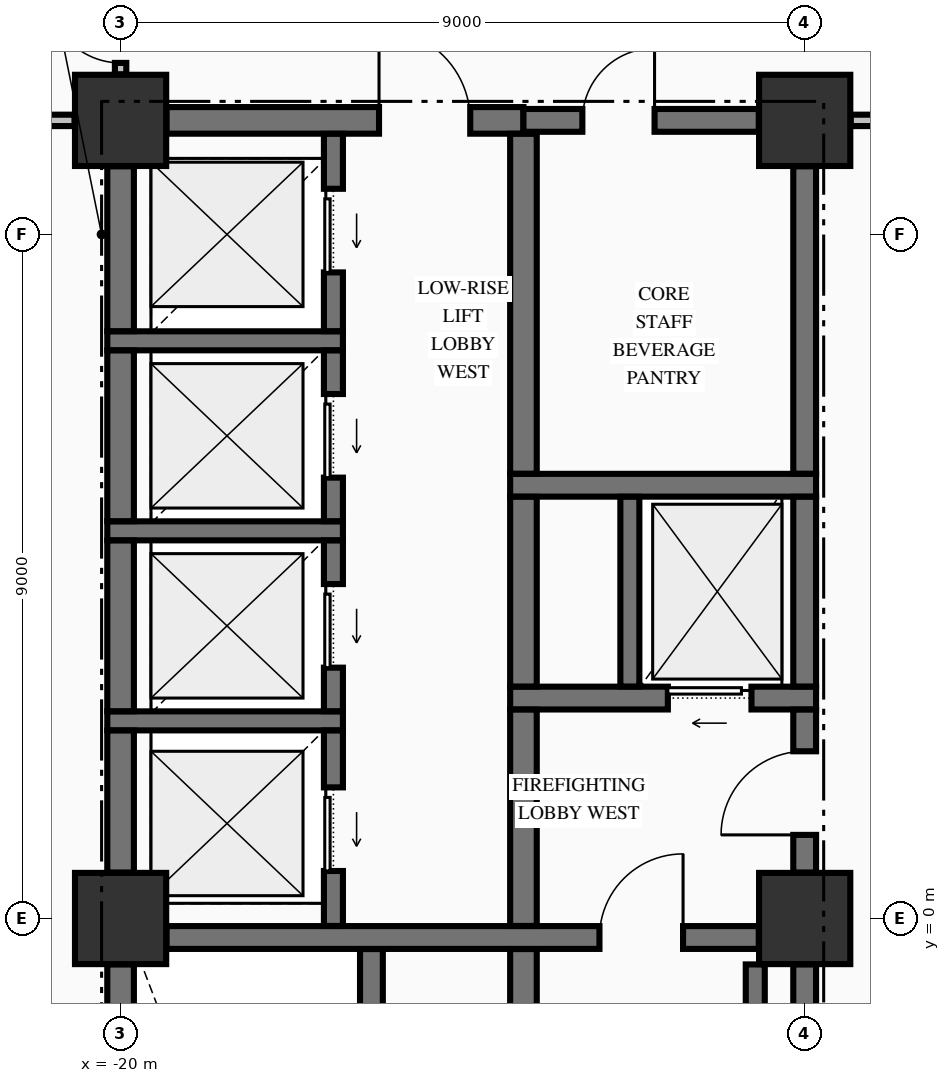
"""IFC4 building model, lengths in metres.
Left out: names, types, materials, properties, quantities, classifications, styles, units other than length and angle.
Written with IfcOpenShell. Run it as: python <this file> out.ifc"""

import sys

from ifc_helpers import new_model, si_unit, direction, frame, frame_2d, origin, origin_2d, place, context, subcontext, project, spatial, rectangle, extrude, element, fill, save


model = new_model("IFC4")
c1 = context("Model", 3, precision=1e-05, world=origin(), true_north=direction((0.0, 1.0)))
c2 = subcontext(c1, "Body", "Model", "MODEL_VIEW")
j1 = project(units=[si_unit("LENGTHUNIT", "METRE"), si_unit("PLANEANGLEUNIT", "RADIAN")], contexts=[c1])
p1 = place(None, origin())
s1 = spatial("IfcSite", under=j1, at=p1, CompositionType="ELEMENT")
p2 = place(p1, origin())
s2 = spatial("IfcBuilding", under=s1, at=p2, CompositionType="ELEMENT")
p3 = place(p2, frame((0.0, 0.0, 30.77)))
s3 = spatial("IfcBuildingStorey", under=s2, at=p3, CompositionType="ELEMENT", Elevation=30.77)
for number, where, z_axis, x_axis in (
    (1, (-20.0, 10.5, -0.25), (0.0, 0.0, 1.0), (1.0, 0.0, 0.0)),
    (2, (-11.0, 0.0, -0.25), (0.0, 0.0, 1.0), (1.0, 0.0, 0.0)),
    (3, (-11.0, 10.5, -0.25), (0.0, 0.0, 1.0), (1.0, 0.0, 0.0)),
    (4, (-20.0, 0.0, -0.25), (0.0, 0.0, 1.0), (1.0, 0.0, 0.0)),
):
    element("IfcColumn", number, at=place(p3, frame(where, z_axis=z_axis, x_axis=x_axis)), inside=s3, PredefinedType="COLUMN", context=c2, shape_type="SweptSolid", body=[
        extrude(rectangle(XDim=1.2, YDim=1.2, at=origin_2d()), origin(), (0.0, 0.0, 1.0), 3.52),
    ])
p4 = place(p3, frame((-19.396, -0.25, 0.0), z_axis=(0.0, 0.0, 1.0), x_axis=(1.0, 0.0, 0.0)))
e5 = element("IfcWall", 5, at=p4, inside=s3, PredefinedType="SHEAR", context=c2, shape_type="SweptSolid", body=[
    extrude(rectangle(XDim=7.792, YDim=0.3, at=frame_2d((3.896, 0.0))), origin(), (0.0, 0.0, 1.0), 3.27),
])
p5 = place(p4, frame((5.696, 0.0, 0.0)))
e6 = element("IfcOpeningElement", 6, at=p5, cuts=e5, PredefinedType="OPENING", context=c2, shape_type="SweptSolid", body=[
    extrude(rectangle(XDim=1.1, YDim=2.15, at=frame_2d((0.55, 1.075))), frame((0.0, 0.16, 0.0), z_axis=(0.0, -1.0, 0.0), x_axis=(1.0, 0.0, 0.0)), (0.0, 0.0, 1.0), 0.32),
])
p6 = place(p3, frame((-20.175, 2.6, 0.0), z_axis=(0.0, 0.0, 1.0), x_axis=(1.0, 0.0, 0.0)))
e7 = element("IfcWall", 7, at=p6, inside=s3, PredefinedType="SOLIDWALL", context=c2, shape_type="SweptSolid", body=[
    extrude(rectangle(XDim=3.1, YDim=0.25, at=frame_2d((1.55, 0.0))), origin(), (0.0, 0.0, 1.0), 3.27),
])
p7 = place(p3, frame((-14.875, 2.9, 0.0), z_axis=(0.0, 0.0, 1.0), x_axis=(1.0, 0.0, 0.0)))
e8 = element("IfcWall", 8, at=p7, inside=s3, PredefinedType="SHEAR", context=c2, shape_type="SweptSolid", body=[
    extrude(rectangle(XDim=4.025, YDim=0.3, at=frame_2d((2.012, 0.0))), origin(), (0.0, 0.0, 1.0), 3.27),
])
p8 = place(p7, frame((2.075, 0.0, 0.0)))
e9 = element("IfcOpeningElement", 9, at=p8, cuts=e8, PredefinedType="OPENING", context=c2, shape_type="SweptSolid", body=[
    extrude(rectangle(XDim=1.1, YDim=2.2, at=frame_2d((0.55, 1.1))), frame((0.0, 0.16, 0.0), z_axis=(0.0, -1.0, 0.0), x_axis=(1.0, 0.0, 0.0)), (0.0, 0.0, 1.0), 0.32),
])
p9 = place(p3, frame((-20.175, 5.1, 0.0), z_axis=(0.0, 0.0, 1.0), x_axis=(1.0, 0.0, 0.0)))
e10 = element("IfcWall", 10, at=p9, inside=s3, PredefinedType="SOLIDWALL", context=c2, shape_type="SweptSolid", body=[
    extrude(rectangle(XDim=3.1, YDim=0.25, at=frame_2d((1.55, 0.0))), origin(), (0.0, 0.0, 1.0), 3.27),
])
p10 = place(p3, frame((-14.875, 5.7, 0.0), z_axis=(0.0, 0.0, 1.0), x_axis=(1.0, 0.0, 0.0)))
e11 = element("IfcWall", 11, at=p10, inside=s3, PredefinedType="SHEAR", context=c2, shape_type="SweptSolid", body=[
    extrude(rectangle(XDim=4.025, YDim=0.3, at=frame_2d((2.012, 0.0))), origin(), (0.0, 0.0, 1.0), 3.27),
])
p11 = place(p3, frame((-20.175, 7.6, 0.0), z_axis=(0.0, 0.0, 1.0), x_axis=(1.0, 0.0, 0.0)))
e12 = element("IfcWall", 12, at=p11, inside=s3, PredefinedType="SOLIDWALL", context=c2, shape_type="SweptSolid", body=[
    extrude(rectangle(XDim=3.1, YDim=0.25, at=frame_2d((1.55, 0.0))), origin(), (0.0, 0.0, 1.0), 3.27),
])
p12 = place(p3, frame((-19.396, 10.5, 0.0), z_axis=(0.0, 0.0, 1.0), x_axis=(1.0, 0.0, 0.0)))
e13 = element("IfcWall", 13, at=p12, inside=s3, PredefinedType="SHEAR", context=c2, shape_type="SweptSolid", body=[
    extrude(rectangle(XDim=4.696, YDim=0.35, at=frame_2d((2.348, 0.0))), origin(), (0.0, 0.0, 1.0), 3.27),
])
p13 = place(p12, frame((2.796, 0.0, 0.0)))
e14 = element("IfcOpeningElement", 14, at=p13, cuts=e13, PredefinedType="OPENING", context=c2, shape_type="SweptSolid", body=[
    extrude(rectangle(XDim=1.2, YDim=2.15, at=frame_2d((0.6, 1.075))), frame((0.0, 0.185, 0.0), z_axis=(0.0, -1.0, 0.0), x_axis=(1.0, 0.0, 0.0)), (0.0, 0.0, 1.0), 0.37),
])
p14 = place(p3, frame((-14.7, 10.5, 0.0), z_axis=(0.0, 0.0, 1.0), x_axis=(1.0, 0.0, 0.0)))
e15 = element("IfcWall", 15, at=p14, inside=s3, PredefinedType="SHEAR", context=c2, shape_type="SweptSolid", body=[
    extrude(rectangle(XDim=3.096, YDim=0.3, at=frame_2d((1.548, 0.0))), origin(), (0.0, 0.0, 1.0), 3.27),
])
p15 = place(p14, frame((0.775, 0.0, 0.0)))
e16 = element("IfcOpeningElement", 16, at=p15, cuts=e15, PredefinedType="OPENING", context=c2, shape_type="SweptSolid", body=[
    extrude(rectangle(XDim=0.95, YDim=2.15, at=frame_2d((0.475, 1.075))), frame((0.0, 0.16, 0.0), z_axis=(0.0, -1.0, 0.0), x_axis=(1.0, 0.0, 0.0)), (0.0, 0.0, 1.0), 0.32),
])
p16 = place(p3, frame((-23.835, 10.5, 0.0), z_axis=(0.0, 0.0, 1.0), x_axis=(1.0, 0.0, 0.0)))
e17 = element("IfcWall", 17, at=p16, inside=s3, PredefinedType="PARTITIONING", context=c2, shape_type="SweptSolid", body=[
    extrude(rectangle(XDim=3.229, YDim=0.15, at=frame_2d((1.615, 0.0))), origin(), (0.0, 0.0, 1.0), 3.27),
])
p17 = place(p16, frame((1.335, 0.0, 0.0)))
e18 = element("IfcOpeningElement", 18, at=p17, cuts=e17, PredefinedType="OPENING", context=c2, shape_type="SweptSolid", body=[
    extrude(rectangle(XDim=1.0, YDim=2.15, at=frame_2d((0.5, 1.075))), frame((0.0, 0.085, 0.0), z_axis=(0.0, -1.0, 0.0), x_axis=(1.0, 0.0, 0.0)), (0.0, 0.0, 1.0), 0.17),
])
p18 = place(p3, frame((-10.394, 10.5, 0.0), z_axis=(0.0, 0.0, 1.0), x_axis=(1.0, 0.0, 0.0)))
e19 = element("IfcWall", 19, at=p18, inside=s3, PredefinedType="PARTITIONING", context=c2, shape_type="SweptSolid", body=[
    extrude(rectangle(XDim=20.788, YDim=0.15, at=frame_2d((10.394, 0.0))), origin(), (0.0, 0.0, 1.0), 3.27),
])
p19 = place(p18, frame((0.319, 0.0, 0.0)))
e20 = element("IfcOpeningElement", 20, at=p19, cuts=e19, PredefinedType="OPENING", context=c2, shape_type="SweptSolid", body=[
    extrude(rectangle(XDim=1.05, YDim=2.15, at=frame_2d((0.525, 1.075))), frame((0.0, 0.085, 0.0), z_axis=(0.0, -1.0, 0.0), x_axis=(1.0, 0.0, 0.0)), (0.0, 0.0, 1.0), 0.17),
])
p20 = place(p18, frame((19.419, 0.0, 0.0)))
e21 = element("IfcOpeningElement", 21, at=p20, cuts=e19, PredefinedType="OPENING", context=c2, shape_type="SweptSolid", body=[
    extrude(rectangle(XDim=1.05, YDim=2.15, at=frame_2d((0.525, 1.075))), frame((0.0, 0.085, 0.0), z_axis=(0.0, -1.0, 0.0), x_axis=(1.0, 0.0, 0.0)), (0.0, 0.0, 1.0), 0.17),
])
p21 = place(p3, frame((-20.0, -9.346, 0.0), z_axis=(0.0, 0.0, 1.0), x_axis=(0.0, 1.0, 0.0)))
e22 = element("IfcWall", 22, at=p21, inside=s3, PredefinedType="SHEAR", context=c2, shape_type="SweptSolid", body=[
    extrude(rectangle(XDim=8.742, YDim=0.35, at=frame_2d((4.371, 0.0))), origin(), (0.0, 0.0, 1.0), 3.27),
])
p22 = place(p3, frame((-20.0, 0.604, 0.0), z_axis=(0.0, 0.0, 1.0), x_axis=(0.0, 1.0, 0.0)))
e23 = element("IfcWall", 23, at=p22, inside=s3, PredefinedType="SHEAR", context=c2, shape_type="SweptSolid", body=[
    extrude(rectangle(XDim=1.869, YDim=0.35, at=frame_2d((0.935, 0.0))), origin(), (0.0, 0.0, 1.0), 3.27),
])
for number, where, z_axis, x_axis in (
    (24, (-20.0, 2.727, 0.0), (0.0, 0.0, 1.0), (0.0, 1.0, 0.0)),
    (25, (-20.0, 5.227, 0.0), (0.0, 0.0, 1.0), (0.0, 1.0, 0.0)),
):
    element("IfcWall", number, at=place(p3, frame(where, z_axis=z_axis, x_axis=x_axis)), inside=s3, PredefinedType="SHEAR", context=c2, shape_type="SweptSolid", body=[
        extrude(rectangle(XDim=2.246, YDim=0.35, at=frame_2d((1.123, 0.0))), origin(), (0.0, 0.0, 1.0), 3.27),
    ])
p23 = place(p3, frame((-20.0, 7.727, 0.0), z_axis=(0.0, 0.0, 1.0), x_axis=(0.0, 1.0, 0.0)))
e26 = element("IfcWall", 26, at=p23, inside=s3, PredefinedType="SHEAR", context=c2, shape_type="SweptSolid", body=[
    extrude(rectangle(XDim=2.169, YDim=0.35, at=frame_2d((1.084, 0.0))), origin(), (0.0, 0.0, 1.0), 3.27),
])
p24 = place(p3, frame((-17.2, -0.098, 0.0), z_axis=(0.0, 0.0, 1.0), x_axis=(0.0, 1.0, 0.0)))
e27 = element("IfcWall", 27, at=p24, inside=s3, PredefinedType="SOLIDWALL", context=c2, shape_type="SweptSolid", body=[
    extrude(rectangle(XDim=2.571, YDim=0.25, at=frame_2d((1.285, 0.0))), origin(), (0.0, 0.0, 1.0), 3.27),
])
p25 = place(p24, frame((0.723, 0.0, 0.0)))
e28 = element("IfcOpeningElement", 28, at=p25, cuts=e27, PredefinedType="OPENING", context=c2, shape_type="SweptSolid", body=[
    extrude(rectangle(XDim=1.1, YDim=2.2, at=frame_2d((0.55, 1.1))), frame((0.0, 0.135, 0.0), z_axis=(0.0, -1.0, 0.0), x_axis=(1.0, 0.0, 0.0)), (0.0, 0.0, 1.0), 0.27),
])
p26 = place(p3, frame((-17.2, 2.727, 0.0), z_axis=(0.0, 0.0, 1.0), x_axis=(0.0, 1.0, 0.0)))
e29 = element("IfcWall", 29, at=p26, inside=s3, PredefinedType="SOLIDWALL", context=c2, shape_type="SweptSolid", body=[
    extrude(rectangle(XDim=2.246, YDim=0.25, at=frame_2d((1.123, 0.0))), origin(), (0.0, 0.0, 1.0), 3.27),
])
p27 = place(p26, frame((0.573, 0.0, 0.0)))
e30 = element("IfcOpeningElement", 30, at=p27, cuts=e29, PredefinedType="OPENING", context=c2, shape_type="SweptSolid", body=[
    extrude(rectangle(XDim=1.1, YDim=2.2, at=frame_2d((0.55, 1.1))), frame((0.0, 0.135, 0.0), z_axis=(0.0, -1.0, 0.0), x_axis=(1.0, 0.0, 0.0)), (0.0, 0.0, 1.0), 0.27),
])
p28 = place(p3, frame((-17.2, 5.227, 0.0), z_axis=(0.0, 0.0, 1.0), x_axis=(0.0, 1.0, 0.0)))
e31 = element("IfcWall", 31, at=p28, inside=s3, PredefinedType="SOLIDWALL", context=c2, shape_type="SweptSolid", body=[
    extrude(rectangle(XDim=2.246, YDim=0.25, at=frame_2d((1.123, 0.0))), origin(), (0.0, 0.0, 1.0), 3.27),
])
p29 = place(p28, frame((0.573, 0.0, 0.0)))
e32 = element("IfcOpeningElement", 32, at=p29, cuts=e31, PredefinedType="OPENING", context=c2, shape_type="SweptSolid", body=[
    extrude(rectangle(XDim=1.1, YDim=2.2, at=frame_2d((0.55, 1.1))), frame((0.0, 0.135, 0.0), z_axis=(0.0, -1.0, 0.0), x_axis=(1.0, 0.0, 0.0)), (0.0, 0.0, 1.0), 0.27),
])
p30 = place(p3, frame((-17.2, 7.727, 0.0), z_axis=(0.0, 0.0, 1.0), x_axis=(0.0, 1.0, 0.0)))
e33 = element("IfcWall", 33, at=p30, inside=s3, PredefinedType="SOLIDWALL", context=c2, shape_type="SweptSolid", body=[
    extrude(rectangle(XDim=2.596, YDim=0.25, at=frame_2d((1.298, 0.0))), origin(), (0.0, 0.0, 1.0), 3.27),
])
p31 = place(p30, frame((0.773, 0.0, 0.0)))
e34 = element("IfcOpeningElement", 34, at=p31, cuts=e33, PredefinedType="OPENING", context=c2, shape_type="SweptSolid", body=[
    extrude(rectangle(XDim=1.1, YDim=2.2, at=frame_2d((0.55, 1.1))), frame((0.0, 0.135, 0.0), z_axis=(0.0, -1.0, 0.0), x_axis=(1.0, 0.0, 0.0)), (0.0, 0.0, 1.0), 0.27),
])
p32 = place(p3, frame((-16.7, -9.773, 0.0), z_axis=(0.0, 0.0, 1.0), x_axis=(0.0, 1.0, 0.0)))
e35 = element("IfcWall", 35, at=p32, inside=s3, PredefinedType="SHEAR", context=c2, shape_type="SweptSolid", body=[
    extrude(rectangle(XDim=9.371, YDim=0.3, at=frame_2d((4.686, 0.0))), origin(), (0.0, 0.0, 1.0), 3.27),
])
p33 = place(p3, frame((-14.7, -9.773, 0.0), z_axis=(0.0, 0.0, 1.0), x_axis=(0.0, 1.0, 0.0)))
e36 = element("IfcWall", 36, at=p33, inside=s3, PredefinedType="SHEAR", context=c2, shape_type="SweptSolid", body=[
    extrude(rectangle(XDim=9.371, YDim=0.35, at=frame_2d((4.686, 0.0))), origin(), (0.0, 0.0, 1.0), 3.27),
])
p34 = place(p3, frame((-14.7, -0.098, 0.0), z_axis=(0.0, 0.0, 1.0), x_axis=(0.0, 1.0, 0.0)))
e37 = element("IfcWall", 37, at=p34, inside=s3, PredefinedType="SHEAR", context=c2, shape_type="SweptSolid", body=[
    extrude(rectangle(XDim=2.846, YDim=0.35, at=frame_2d((1.423, 0.0))), origin(), (0.0, 0.0, 1.0), 3.27),
])
p35 = place(p3, frame((-14.7, 3.052, 0.0), z_axis=(0.0, 0.0, 1.0), x_axis=(0.0, 1.0, 0.0)))
e38 = element("IfcWall", 38, at=p35, inside=s3, PredefinedType="SHEAR", context=c2, shape_type="SweptSolid", body=[
    extrude(rectangle(XDim=2.496, YDim=0.35, at=frame_2d((1.248, 0.0))), origin(), (0.0, 0.0, 1.0), 3.27),
])
p36 = place(p3, frame((-14.7, 5.852, 0.0), z_axis=(0.0, 0.0, 1.0), x_axis=(0.0, 1.0, 0.0)))
e39 = element("IfcWall", 39, at=p36, inside=s3, PredefinedType="SHEAR", context=c2, shape_type="SweptSolid", body=[
    extrude(rectangle(XDim=4.471, YDim=0.35, at=frame_2d((2.235, 0.0))), origin(), (0.0, 0.0, 1.0), 3.27),
])
p37 = place(p3, frame((-13.3, 3.052, 0.0), z_axis=(0.0, 0.0, 1.0), x_axis=(0.0, 1.0, 0.0)))
e40 = element("IfcWall", 40, at=p37, inside=s3, PredefinedType="SOLIDWALL", context=c2, shape_type="SweptSolid", body=[
    extrude(rectangle(XDim=2.496, YDim=0.25, at=frame_2d((1.248, 0.0))), origin(), (0.0, 0.0, 1.0), 3.27),
])
p38 = place(p3, frame((-11.65, -9.346, 0.0), z_axis=(0.0, 0.0, 1.0), x_axis=(0.0, 1.0, 0.0)))
e41 = element("IfcWall", 41, at=p38, inside=s3, PredefinedType="SOLIDWALL", context=c2, shape_type="SweptSolid", body=[
    extrude(rectangle(XDim=8.742, YDim=0.25, at=frame_2d((4.371, 0.0))), origin(), (0.0, 0.0, 1.0), 3.27),
])
p39 = place(p3, frame((-11.0, -9.346, 0.0), z_axis=(0.0, 0.0, 1.0), x_axis=(0.0, 1.0, 0.0)))
e42 = element("IfcWall", 42, at=p39, inside=s3, PredefinedType="SHEAR", context=c2, shape_type="SweptSolid", body=[
    extrude(rectangle(XDim=8.742, YDim=0.3, at=frame_2d((4.371, 0.0))), origin(), (0.0, 0.0, 1.0), 3.27),
])
p40 = place(p3, frame((-11.0, 0.604, 0.0), z_axis=(0.0, 0.0, 1.0), x_axis=(0.0, 1.0, 0.0)))
e43 = element("IfcWall", 43, at=p40, inside=s3, PredefinedType="SHEAR", context=c2, shape_type="SweptSolid", body=[
    extrude(rectangle(XDim=2.144, YDim=0.3, at=frame_2d((1.072, 0.0))), origin(), (0.0, 0.0, 1.0), 3.27),
])
p41 = place(p40, frame((0.496, 0.0, 0.0)))
e44 = element("IfcOpeningElement", 44, at=p41, cuts=e43, PredefinedType="OPENING", context=c2, shape_type="SweptSolid", body=[
    extrude(rectangle(XDim=1.1, YDim=2.15, at=frame_2d((0.55, 1.075))), frame((0.0, 0.16, 0.0), z_axis=(0.0, -1.0, 0.0), x_axis=(1.0, 0.0, 0.0)), (0.0, 0.0, 1.0), 0.32),
])
p42 = place(p3, frame((-11.0, 3.052, 0.0), z_axis=(0.0, 0.0, 1.0), x_axis=(0.0, 1.0, 0.0)))
e45 = element("IfcWall", 45, at=p42, inside=s3, PredefinedType="SHEAR", context=c2, shape_type="SweptSolid", body=[
    extrude(rectangle(XDim=2.496, YDim=0.3, at=frame_2d((1.248, 0.0))), origin(), (0.0, 0.0, 1.0), 3.27),
])
p43 = place(p3, frame((-11.0, 5.852, 0.0), z_axis=(0.0, 0.0, 1.0), x_axis=(0.0, 1.0, 0.0)))
e46 = element("IfcWall", 46, at=p43, inside=s3, PredefinedType="SHEAR", context=c2, shape_type="SweptSolid", body=[
    extrude(rectangle(XDim=4.044, YDim=0.3, at=frame_2d((2.022, 0.0))), origin(), (0.0, 0.0, 1.0), 3.27),
])
p44 = place(p3, frame((-20.0, 11.106, 0.0), z_axis=(0.0, 0.0, 1.0), x_axis=(0.0, 1.0, 0.0)))
e47 = element("IfcWall", 47, at=p44, inside=s3, PredefinedType="PARTITIONING", context=c2, shape_type="SweptSolid", body=[
    extrude(rectangle(XDim=1.566, YDim=0.15, at=frame_2d((0.783, 0.0))), origin(), (0.0, 0.0, 1.0), 3.27),
])
p45 = place(p44, frame((0.15, 0.0, 0.0)))
e48 = element("IfcOpeningElement", 48, at=p45, cuts=e47, PredefinedType="OPENING", context=c2, shape_type="SweptSolid", body=[
    extrude(rectangle(XDim=0.95, YDim=2.15, at=frame_2d((0.475, 1.075))), frame((0.0, 0.085, 0.0), z_axis=(0.0, -1.0, 0.0), x_axis=(1.0, 0.0, 0.0)), (0.0, 0.0, 1.0), 0.17),
])
p46 = place(p5, origin())
e49 = element("IfcDoor", 49, at=p46, inside=s3, OperationType="SINGLE_SWING_RIGHT", PredefinedType="DOOR", context=c2, shape_type="SweptSolid", body=[
    extrude(rectangle(XDim=1.1, YDim=2.15, at=frame_2d((0.55, 1.075))), frame((0.0, 0.025, 0.0), z_axis=(0.0, -1.0, 0.0), x_axis=(1.0, 0.0, 0.0)), (0.0, 0.0, 1.0), 0.05),
])
fill(e6, e49)
p47 = place(p41, origin())
e50 = element("IfcDoor", 50, at=p47, inside=s3, OperationType="SINGLE_SWING_LEFT", PredefinedType="DOOR", context=c2, shape_type="SweptSolid", body=[
    extrude(rectangle(XDim=1.1, YDim=2.15, at=frame_2d((0.55, 1.075))), frame((0.0, 0.025, 0.0), z_axis=(0.0, -1.0, 0.0), x_axis=(1.0, 0.0, 0.0)), (0.0, 0.0, 1.0), 0.05),
])
fill(e44, e50)
p48 = place(p8, origin())
e51 = element("IfcDoor", 51, at=p48, inside=s3, OperationType="SLIDING_TO_LEFT", PredefinedType="DOOR", context=c2, shape_type="SweptSolid", body=[
    extrude(rectangle(XDim=1.1, YDim=2.2, at=frame_2d((0.55, 1.1))), frame((0.0, 0.025, 0.0), z_axis=(0.0, -1.0, 0.0), x_axis=(1.0, 0.0, 0.0)), (0.0, 0.0, 1.0), 0.05),
])
fill(e9, e51)
p49 = place(p15, origin())
e52 = element("IfcDoor", 52, at=p49, inside=s3, OperationType="SINGLE_SWING_RIGHT", PredefinedType="DOOR", context=c2, shape_type="SweptSolid", body=[
    extrude(rectangle(XDim=0.95, YDim=2.15, at=frame_2d((0.475, 1.075))), frame((0.0, 0.025, 0.0), z_axis=(0.0, -1.0, 0.0), x_axis=(1.0, 0.0, 0.0)), (0.0, 0.0, 1.0), 0.05),
])
fill(e16, e52)
p50 = place(p13, origin())
e53 = element("IfcDoor", 53, at=p50, inside=s3, OperationType="SINGLE_SWING_LEFT", PredefinedType="DOOR", context=c2, shape_type="SweptSolid", body=[
    extrude(rectangle(XDim=1.2, YDim=2.15, at=frame_2d((0.6, 1.075))), frame((0.0, 0.025, 0.0), z_axis=(0.0, -1.0, 0.0), x_axis=(1.0, 0.0, 0.0)), (0.0, 0.0, 1.0), 0.05),
])
fill(e14, e53)
p51 = place(p25, origin())
e54 = element("IfcDoor", 54, at=p51, inside=s3, OperationType="SLIDING_TO_LEFT", PredefinedType="DOOR", context=c2, shape_type="SweptSolid", body=[
    extrude(rectangle(XDim=1.1, YDim=2.2, at=frame_2d((0.55, 1.1))), frame((0.0, 0.025, 0.0), z_axis=(0.0, -1.0, 0.0), x_axis=(1.0, 0.0, 0.0)), (0.0, 0.0, 1.0), 0.05),
])
fill(e28, e54)
p52 = place(p27, origin())
e55 = element("IfcDoor", 55, at=p52, inside=s3, OperationType="SLIDING_TO_LEFT", PredefinedType="DOOR", context=c2, shape_type="SweptSolid", body=[
    extrude(rectangle(XDim=1.1, YDim=2.2, at=frame_2d((0.55, 1.1))), frame((0.0, 0.025, 0.0), z_axis=(0.0, -1.0, 0.0), x_axis=(1.0, 0.0, 0.0)), (0.0, 0.0, 1.0), 0.05),
])
fill(e30, e55)
p53 = place(p29, origin())
e56 = element("IfcDoor", 56, at=p53, inside=s3, OperationType="SLIDING_TO_LEFT", PredefinedType="DOOR", context=c2, shape_type="SweptSolid", body=[
    extrude(rectangle(XDim=1.1, YDim=2.2, at=frame_2d((0.55, 1.1))), frame((0.0, 0.025, 0.0), z_axis=(0.0, -1.0, 0.0), x_axis=(1.0, 0.0, 0.0)), (0.0, 0.0, 1.0), 0.05),
])
fill(e32, e56)
p54 = place(p31, origin())
e57 = element("IfcDoor", 57, at=p54, inside=s3, OperationType="SLIDING_TO_LEFT", PredefinedType="DOOR", context=c2, shape_type="SweptSolid", body=[
    extrude(rectangle(XDim=1.1, YDim=2.2, at=frame_2d((0.55, 1.1))), frame((0.0, 0.025, 0.0), z_axis=(0.0, -1.0, 0.0), x_axis=(1.0, 0.0, 0.0)), (0.0, 0.0, 1.0), 0.05),
])
fill(e34, e57)
p55 = place(p45, origin())
e58 = element("IfcDoor", 58, at=p55, inside=s3, OperationType="SINGLE_SWING_RIGHT", PredefinedType="DOOR", context=c2, shape_type="SweptSolid", body=[
    extrude(rectangle(XDim=0.95, YDim=2.15, at=frame_2d((0.475, 1.075))), frame((0.0, 0.025, 0.0), z_axis=(0.0, -1.0, 0.0), x_axis=(1.0, 0.0, 0.0)), (0.0, 0.0, 1.0), 0.05),
])
fill(e48, e58)
save(model, sys.argv[1])
